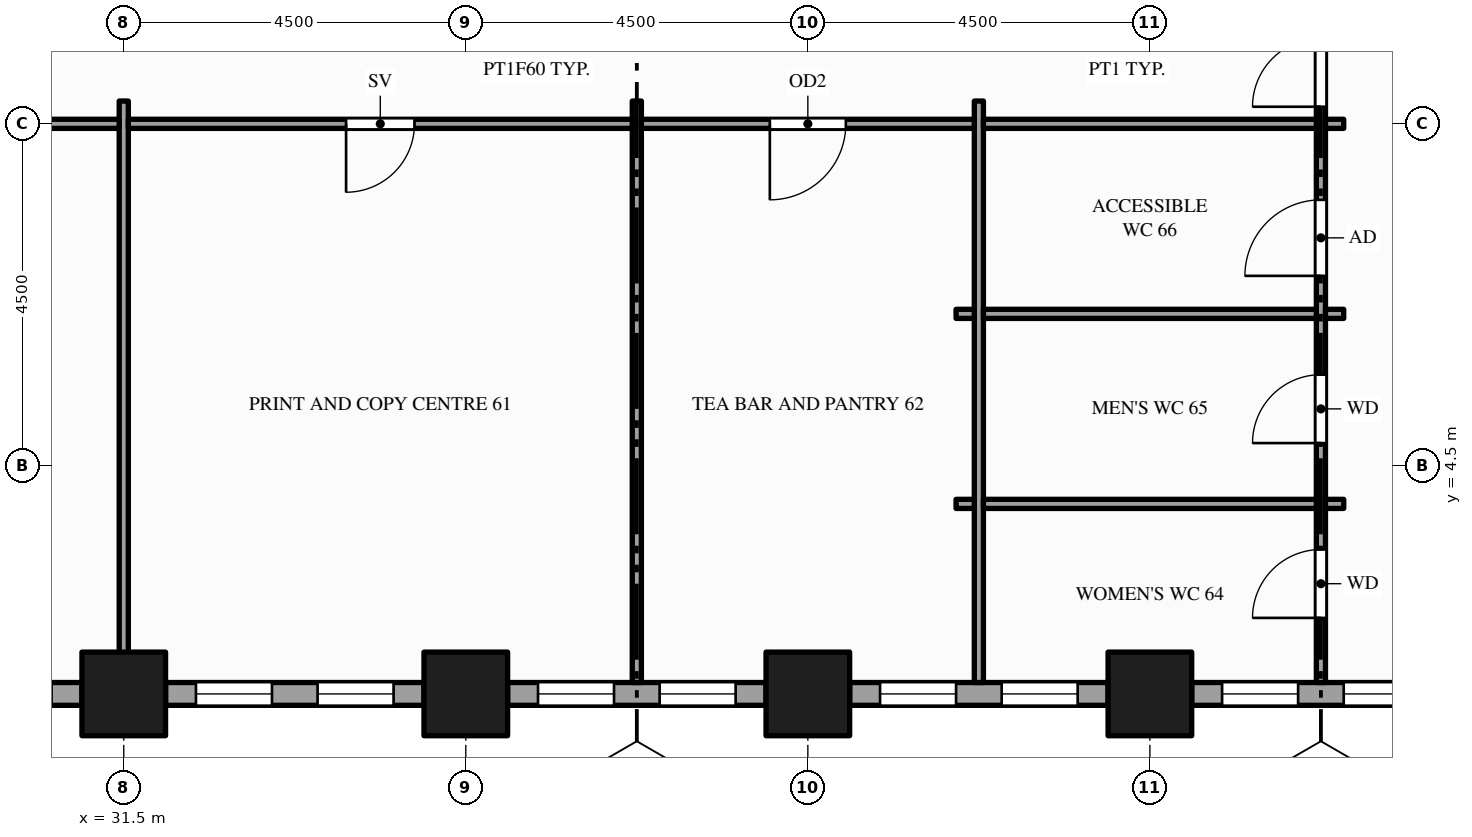
"""IFC4 building model, lengths in metres.
Left out: names, types, materials, properties, quantities, classifications, styles, units other than length and angle.
Written with IfcOpenShell. Run it as: python <this file> out.ifc"""

import sys

from ifc_helpers import new_model, si_unit, direction, frame, frame_2d, origin, origin_2d, place, context, subcontext, project, spatial, rectangle, hollow_rectangle, extrude, element, fill, save


model = new_model("IFC4")
c1 = context("Model", 3, precision=1e-05, world=origin(), true_north=direction((0.0, 1.0)))
c2 = subcontext(c1, "Body", "Model", "MODEL_VIEW")
j1 = project(units=[si_unit("LENGTHUNIT", "METRE"), si_unit("PLANEANGLEUNIT", "RADIAN")], contexts=[c1])
p1 = place(None, origin())
s1 = spatial("IfcSite", under=j1, at=p1, CompositionType="ELEMENT")
p2 = place(p1, origin())
s2 = spatial("IfcBuilding", under=s1, at=p2, CompositionType="ELEMENT")
p3 = place(p2, frame((0.0, 0.0, 73.0)))
s3 = spatial("IfcBuildingStorey", under=s2, at=p3, CompositionType="ELEMENT", Elevation=73.0)
for number, where, z_axis, x_axis in (
    (1, (31.5, 1.5, -0.15), (0.0, 0.0, 1.0), (1.0, 0.0, 0.0)),
    (2, (36.0, 1.5, -0.15), (0.0, 0.0, 1.0), (1.0, 0.0, 0.0)),
    (3, (40.5, 1.5, -0.15), (0.0, 0.0, 1.0), (1.0, 0.0, 0.0)),
    (4, (45.0, 1.5, -0.15), (0.0, 0.0, 1.0), (1.0, 0.0, 0.0)),
):
    element("IfcColumn", number, at=place(p3, frame(where, z_axis=z_axis, x_axis=x_axis)), inside=s3, PredefinedType="COLUMN", context=c2, shape_type="SweptSolid", body=[
        extrude(hollow_rectangle(XDim=1.1, YDim=1.1, WallThickness=0.06, at=origin_2d()), origin(), (0.0, 0.0, 1.0), 3.9),
    ])
p4 = place(p3, frame((27.55, 1.5, 0.0), z_axis=(0.0, 0.0, 1.0), x_axis=(1.0, 0.0, 0.0)))
e5 = element("IfcWall", 5, at=p4, inside=s3, PredefinedType="STANDARD", context=c2, shape_type="SweptSolid", body=[
    extrude(rectangle(XDim=3.4, YDim=0.3, at=frame_2d((1.7, 0.0))), origin(), (0.0, 0.0, 1.0), 2.838),
])
p5 = place(p4, frame((0.4, 0.0, 0.9)))
e6 = element("IfcOpeningElement", 6, at=p5, cuts=e5, PredefinedType="OPENING", context=c2, shape_type="SweptSolid", body=[
    extrude(rectangle(XDim=1.0, YDim=1.75, at=frame_2d((0.5, 0.875))), frame((0.0, 0.16, 0.0), z_axis=(0.0, -1.0, 0.0), x_axis=(1.0, 0.0, 0.0)), (0.0, 0.0, 1.0), 0.32),
])
p6 = place(p4, frame((2.0, 0.0, 0.9)))
e7 = element("IfcOpeningElement", 7, at=p6, cuts=e5, PredefinedType="OPENING", context=c2, shape_type="SweptSolid", body=[
    extrude(rectangle(XDim=1.0, YDim=1.75, at=frame_2d((0.5, 0.875))), frame((0.0, 0.16, 0.0), z_axis=(0.0, -1.0, 0.0), x_axis=(1.0, 0.0, 0.0)), (0.0, 0.0, 1.0), 0.32),
])
p7 = place(p3, frame((32.05, 1.5, 0.0), z_axis=(0.0, 0.0, 1.0), x_axis=(1.0, 0.0, 0.0)))
e8 = element("IfcWall", 8, at=p7, inside=s3, PredefinedType="STANDARD", context=c2, shape_type="SweptSolid", body=[
    extrude(rectangle(XDim=3.4, YDim=0.3, at=frame_2d((1.7, 0.0))), origin(), (0.0, 0.0, 1.0), 2.838),
])
p8 = place(p7, frame((0.4, 0.0, 0.9)))
e9 = element("IfcOpeningElement", 9, at=p8, cuts=e8, PredefinedType="OPENING", context=c2, shape_type="SweptSolid", body=[
    extrude(rectangle(XDim=1.0, YDim=1.75, at=frame_2d((0.5, 0.875))), frame((0.0, 0.16, 0.0), z_axis=(0.0, -1.0, 0.0), x_axis=(1.0, 0.0, 0.0)), (0.0, 0.0, 1.0), 0.32),
])
p9 = place(p7, frame((2.0, 0.0, 0.9)))
e10 = element("IfcOpeningElement", 10, at=p9, cuts=e8, PredefinedType="OPENING", context=c2, shape_type="SweptSolid", body=[
    extrude(rectangle(XDim=1.0, YDim=1.75, at=frame_2d((0.5, 0.875))), frame((0.0, 0.16, 0.0), z_axis=(0.0, -1.0, 0.0), x_axis=(1.0, 0.0, 0.0)), (0.0, 0.0, 1.0), 0.32),
])
p10 = place(p3, frame((36.55, 1.5, 0.0), z_axis=(0.0, 0.0, 1.0), x_axis=(1.0, 0.0, 0.0)))
e11 = element("IfcWall", 11, at=p10, inside=s3, PredefinedType="STANDARD", context=c2, shape_type="SweptSolid", body=[
    extrude(rectangle(XDim=3.4, YDim=0.3, at=frame_2d((1.7, 0.0))), origin(), (0.0, 0.0, 1.0), 2.838),
])
p11 = place(p10, frame((0.4, 0.0, 0.9)))
e12 = element("IfcOpeningElement", 12, at=p11, cuts=e11, PredefinedType="OPENING", context=c2, shape_type="SweptSolid", body=[
    extrude(rectangle(XDim=1.0, YDim=1.75, at=frame_2d((0.5, 0.875))), frame((0.0, 0.16, 0.0), z_axis=(0.0, -1.0, 0.0), x_axis=(1.0, 0.0, 0.0)), (0.0, 0.0, 1.0), 0.32),
])
p12 = place(p10, frame((2.0, 0.0, 0.9)))
e13 = element("IfcOpeningElement", 13, at=p12, cuts=e11, PredefinedType="OPENING", context=c2, shape_type="SweptSolid", body=[
    extrude(rectangle(XDim=1.0, YDim=1.75, at=frame_2d((0.5, 0.875))), frame((0.0, 0.16, 0.0), z_axis=(0.0, -1.0, 0.0), x_axis=(1.0, 0.0, 0.0)), (0.0, 0.0, 1.0), 0.32),
])
p13 = place(p3, frame((41.05, 1.5, 0.0), z_axis=(0.0, 0.0, 1.0), x_axis=(1.0, 0.0, 0.0)))
e14 = element("IfcWall", 14, at=p13, inside=s3, PredefinedType="STANDARD", context=c2, shape_type="SweptSolid", body=[
    extrude(rectangle(XDim=3.4, YDim=0.3, at=frame_2d((1.7, 0.0))), origin(), (0.0, 0.0, 1.0), 2.838),
])
p14 = place(p13, frame((0.4, 0.0, 0.9)))
e15 = element("IfcOpeningElement", 15, at=p14, cuts=e14, PredefinedType="OPENING", context=c2, shape_type="SweptSolid", body=[
    extrude(rectangle(XDim=1.0, YDim=1.75, at=frame_2d((0.5, 0.875))), frame((0.0, 0.16, 0.0), z_axis=(0.0, -1.0, 0.0), x_axis=(1.0, 0.0, 0.0)), (0.0, 0.0, 1.0), 0.32),
])
p15 = place(p13, frame((2.0, 0.0, 0.9)))
e16 = element("IfcOpeningElement", 16, at=p15, cuts=e14, PredefinedType="OPENING", context=c2, shape_type="SweptSolid", body=[
    extrude(rectangle(XDim=1.0, YDim=1.75, at=frame_2d((0.5, 0.875))), frame((0.0, 0.16, 0.0), z_axis=(0.0, -1.0, 0.0), x_axis=(1.0, 0.0, 0.0)), (0.0, 0.0, 1.0), 0.32),
])
p16 = place(p3, frame((45.55, 1.5, 0.0), z_axis=(0.0, 0.0, 1.0), x_axis=(1.0, 0.0, 0.0)))
e17 = element("IfcWall", 17, at=p16, inside=s3, PredefinedType="STANDARD", context=c2, shape_type="SweptSolid", body=[
    extrude(rectangle(XDim=3.4, YDim=0.3, at=frame_2d((1.7, 0.0))), origin(), (0.0, 0.0, 1.0), 2.838),
])
p17 = place(p16, frame((0.4, 0.0, 0.9)))
e18 = element("IfcOpeningElement", 18, at=p17, cuts=e17, PredefinedType="OPENING", context=c2, shape_type="SweptSolid", body=[
    extrude(rectangle(XDim=1.0, YDim=1.75, at=frame_2d((0.5, 0.875))), frame((0.0, 0.16, 0.0), z_axis=(0.0, -1.0, 0.0), x_axis=(1.0, 0.0, 0.0)), (0.0, 0.0, 1.0), 0.32),
])
p18 = place(p16, frame((2.0, 0.0, 0.9)))
e19 = element("IfcOpeningElement", 19, at=p18, cuts=e17, PredefinedType="OPENING", context=c2, shape_type="SweptSolid", body=[
    extrude(rectangle(XDim=1.0, YDim=1.75, at=frame_2d((0.5, 0.875))), frame((0.0, 0.16, 0.0), z_axis=(0.0, -1.0, 0.0), x_axis=(1.0, 0.0, 0.0)), (0.0, 0.0, 1.0), 0.32),
])
for number, where, z_axis, x_axis in (
    (20, (31.5, 1.65, 0.0), (0.0, 0.0, 1.0), (0.0, 1.0, 0.0)),
    (21, (38.25, 1.65, 0.0), (0.0, 0.0, 1.0), (0.0, 1.0, 0.0)),
    (22, (42.75, 1.65, 0.0), (0.0, 0.0, 1.0), (0.0, 1.0, 0.0)),
):
    element("IfcWall", number, at=place(p3, frame(where, z_axis=z_axis, x_axis=x_axis)), inside=s3, PredefinedType="PARTITIONING", context=c2, shape_type="SweptSolid", body=[
        extrude(rectangle(XDim=7.65, YDim=0.12, at=frame_2d((3.825, 0.0))), origin(), (0.0, 0.0, 1.0), 2.838),
    ])
p19 = place(p3, frame((47.25, 1.65, 0.0), z_axis=(0.0, 0.0, 1.0), x_axis=(0.0, 1.0, 0.0)))
e23 = element("IfcWall", 23, at=p19, inside=s3, PredefinedType="PARTITIONING", context=c2, shape_type="SweptSolid", body=[
    extrude(rectangle(XDim=22.2, YDim=0.12, at=frame_2d((11.1, 0.0))), origin(), (0.0, 0.0, 1.0), 2.838),
])
p20 = place(p19, frame((7.575, 0.0, 0.0)))
e24 = element("IfcOpeningElement", 24, at=p20, cuts=e23, PredefinedType="OPENING", context=c2, shape_type="SweptSolid", body=[
    extrude(rectangle(XDim=1.8, YDim=2.1, at=frame_2d((0.9, 1.05))), frame((0.0, 0.07, 0.0), z_axis=(0.0, -1.0, 0.0), x_axis=(1.0, 0.0, 0.0)), (0.0, 0.0, 1.0), 0.14),
])
p21 = place(p19, frame((0.85, 0.0, 0.0)))
e25 = element("IfcOpeningElement", 25, at=p21, cuts=e23, PredefinedType="OPENING", context=c2, shape_type="SweptSolid", body=[
    extrude(rectangle(XDim=0.9, YDim=2.1, at=frame_2d((0.45, 1.05))), frame((0.0, 0.07, 0.0), z_axis=(0.0, -1.0, 0.0), x_axis=(1.0, 0.0, 0.0)), (0.0, 0.0, 1.0), 0.14),
])
p22 = place(p19, frame((3.15, 0.0, 0.0)))
e26 = element("IfcOpeningElement", 26, at=p22, cuts=e23, PredefinedType="OPENING", context=c2, shape_type="SweptSolid", body=[
    extrude(rectangle(XDim=0.9, YDim=2.1, at=frame_2d((0.45, 1.05))), frame((0.0, 0.07, 0.0), z_axis=(0.0, -1.0, 0.0), x_axis=(1.0, 0.0, 0.0)), (0.0, 0.0, 1.0), 0.14),
])
p23 = place(p19, frame((5.35, 0.0, 0.0)))
e27 = element("IfcOpeningElement", 27, at=p23, cuts=e23, PredefinedType="OPENING", context=c2, shape_type="SweptSolid", body=[
    extrude(rectangle(XDim=1.0, YDim=2.1, at=frame_2d((0.5, 1.05))), frame((0.0, 0.07, 0.0), z_axis=(0.0, -1.0, 0.0), x_axis=(1.0, 0.0, 0.0)), (0.0, 0.0, 1.0), 0.14),
])
p24 = place(p3, frame((42.45, 4.0, 0.0), z_axis=(0.0, 0.0, 1.0), x_axis=(1.0, 0.0, 0.0)))
e28 = element("IfcWall", 28, at=p24, inside=s3, PredefinedType="PARTITIONING", context=c2, shape_type="SweptSolid", body=[
    extrude(rectangle(XDim=0.24, YDim=0.12, at=frame_2d((0.12, 0.0))), origin(), (0.0, 0.0, 1.0), 2.838),
])
p25 = place(p3, frame((42.81, 4.0, 0.0), z_axis=(0.0, 0.0, 1.0), x_axis=(1.0, 0.0, 0.0)))
e29 = element("IfcWall", 29, at=p25, inside=s3, PredefinedType="PARTITIONING", context=c2, shape_type="SweptSolid", body=[
    extrude(rectangle(XDim=4.38, YDim=0.12, at=frame_2d((2.19, 0.0))), origin(), (0.0, 0.0, 1.0), 2.838),
])
for number, where, z_axis, x_axis in (
    (30, (47.31, 4.0, 0.0), (0.0, 0.0, 1.0), (1.0, 0.0, 0.0)),
    (31, (42.45, 6.5, 0.0), (0.0, 0.0, 1.0), (1.0, 0.0, 0.0)),
):
    element("IfcWall", number, at=place(p3, frame(where, z_axis=z_axis, x_axis=x_axis)), inside=s3, PredefinedType="PARTITIONING", context=c2, shape_type="SweptSolid", body=[
        extrude(rectangle(XDim=0.24, YDim=0.12, at=frame_2d((0.12, 0.0))), origin(), (0.0, 0.0, 1.0), 2.838),
    ])
p26 = place(p3, frame((42.81, 6.5, 0.0), z_axis=(0.0, 0.0, 1.0), x_axis=(1.0, 0.0, 0.0)))
e32 = element("IfcWall", 32, at=p26, inside=s3, PredefinedType="PARTITIONING", context=c2, shape_type="SweptSolid", body=[
    extrude(rectangle(XDim=4.38, YDim=0.12, at=frame_2d((2.19, 0.0))), origin(), (0.0, 0.0, 1.0), 2.838),
])
p27 = place(p3, frame((47.31, 6.5, 0.0), z_axis=(0.0, 0.0, 1.0), x_axis=(1.0, 0.0, 0.0)))
e33 = element("IfcWall", 33, at=p27, inside=s3, PredefinedType="PARTITIONING", context=c2, shape_type="SweptSolid", body=[
    extrude(rectangle(XDim=0.24, YDim=0.12, at=frame_2d((0.12, 0.0))), origin(), (0.0, 0.0, 1.0), 2.838),
])
p28 = place(p3, frame((27.06, 9.0, 0.0), z_axis=(0.0, 0.0, 1.0), x_axis=(1.0, 0.0, 0.0)))
e34 = element("IfcWall", 34, at=p28, inside=s3, PredefinedType="PARTITIONING", context=c2, shape_type="SweptSolid", body=[
    extrude(rectangle(XDim=4.38, YDim=0.12, at=frame_2d((2.19, 0.0))), origin(), (0.0, 0.0, 1.0), 2.838),
])
p29 = place(p28, frame((1.74, 0.0, 0.0)))
e35 = element("IfcOpeningElement", 35, at=p29, cuts=e34, PredefinedType="OPENING", context=c2, shape_type="SweptSolid", body=[
    extrude(rectangle(XDim=0.9, YDim=2.1, at=frame_2d((0.45, 1.05))), frame((0.0, 0.07, 0.0), z_axis=(0.0, -1.0, 0.0), x_axis=(1.0, 0.0, 0.0)), (0.0, 0.0, 1.0), 0.14),
])
p30 = place(p3, frame((31.56, 9.0, 0.0), z_axis=(0.0, 0.0, 1.0), x_axis=(1.0, 0.0, 0.0)))
e36 = element("IfcWall", 36, at=p30, inside=s3, PredefinedType="PARTITIONING", context=c2, shape_type="SweptSolid", body=[
    extrude(rectangle(XDim=6.63, YDim=0.12, at=frame_2d((3.315, 0.0))), origin(), (0.0, 0.0, 1.0), 2.838),
])
p31 = place(p30, frame((2.865, 0.0, 0.0)))
e37 = element("IfcOpeningElement", 37, at=p31, cuts=e36, PredefinedType="OPENING", context=c2, shape_type="SweptSolid", body=[
    extrude(rectangle(XDim=0.9, YDim=2.1, at=frame_2d((0.45, 1.05))), frame((0.0, 0.07, 0.0), z_axis=(0.0, -1.0, 0.0), x_axis=(1.0, 0.0, 0.0)), (0.0, 0.0, 1.0), 0.14),
])
p32 = place(p3, frame((38.31, 9.0, 0.0), z_axis=(0.0, 0.0, 1.0), x_axis=(1.0, 0.0, 0.0)))
e38 = element("IfcWall", 38, at=p32, inside=s3, PredefinedType="PARTITIONING", context=c2, shape_type="SweptSolid", body=[
    extrude(rectangle(XDim=4.38, YDim=0.12, at=frame_2d((2.19, 0.0))), origin(), (0.0, 0.0, 1.0), 2.838),
])
p33 = place(p32, frame((1.69, 0.0, 0.0)))
e39 = element("IfcOpeningElement", 39, at=p33, cuts=e38, PredefinedType="OPENING", context=c2, shape_type="SweptSolid", body=[
    extrude(rectangle(XDim=1.0, YDim=2.1, at=frame_2d((0.5, 1.05))), frame((0.0, 0.07, 0.0), z_axis=(0.0, -1.0, 0.0), x_axis=(1.0, 0.0, 0.0)), (0.0, 0.0, 1.0), 0.14),
])
p34 = place(p3, frame((42.81, 9.0, 0.0), z_axis=(0.0, 0.0, 1.0), x_axis=(1.0, 0.0, 0.0)))
e40 = element("IfcWall", 40, at=p34, inside=s3, PredefinedType="PARTITIONING", context=c2, shape_type="SweptSolid", body=[
    extrude(rectangle(XDim=4.38, YDim=0.12, at=frame_2d((2.19, 0.0))), origin(), (0.0, 0.0, 1.0), 2.838),
])
p35 = place(p3, frame((47.31, 9.0, 0.0), z_axis=(0.0, 0.0, 1.0), x_axis=(1.0, 0.0, 0.0)))
e41 = element("IfcWall", 41, at=p35, inside=s3, PredefinedType="PARTITIONING", context=c2, shape_type="SweptSolid", body=[
    extrude(rectangle(XDim=0.24, YDim=0.12, at=frame_2d((0.12, 0.0))), origin(), (0.0, 0.0, 1.0), 2.838),
])
p36 = place(p8, origin())
e42 = element("IfcWindow", 42, at=p36, inside=s3, PartitioningType="SINGLE_PANEL", PredefinedType="WINDOW", context=c2, shape_type="SweptSolid", body=[
    extrude(rectangle(XDim=1.0, YDim=1.75, at=frame_2d((0.5, 0.875))), frame((0.0, 0.03, 0.0), z_axis=(0.0, -1.0, 0.0), x_axis=(1.0, 0.0, 0.0)), (0.0, 0.0, 1.0), 0.06),
])
fill(e9, e42)
p37 = place(p9, origin())
e43 = element("IfcWindow", 43, at=p37, inside=s3, PartitioningType="SINGLE_PANEL", PredefinedType="WINDOW", context=c2, shape_type="SweptSolid", body=[
    extrude(rectangle(XDim=1.0, YDim=1.75, at=frame_2d((0.5, 0.875))), frame((0.0, 0.03, 0.0), z_axis=(0.0, -1.0, 0.0), x_axis=(1.0, 0.0, 0.0)), (0.0, 0.0, 1.0), 0.06),
])
fill(e10, e43)
p38 = place(p11, origin())
e44 = element("IfcWindow", 44, at=p38, inside=s3, PartitioningType="SINGLE_PANEL", PredefinedType="WINDOW", context=c2, shape_type="SweptSolid", body=[
    extrude(rectangle(XDim=1.0, YDim=1.75, at=frame_2d((0.5, 0.875))), frame((0.0, 0.03, 0.0), z_axis=(0.0, -1.0, 0.0), x_axis=(1.0, 0.0, 0.0)), (0.0, 0.0, 1.0), 0.06),
])
fill(e12, e44)
p39 = place(p12, origin())
e45 = element("IfcWindow", 45, at=p39, inside=s3, PartitioningType="SINGLE_PANEL", PredefinedType="WINDOW", context=c2, shape_type="SweptSolid", body=[
    extrude(rectangle(XDim=1.0, YDim=1.75, at=frame_2d((0.5, 0.875))), frame((0.0, 0.03, 0.0), z_axis=(0.0, -1.0, 0.0), x_axis=(1.0, 0.0, 0.0)), (0.0, 0.0, 1.0), 0.06),
])
fill(e13, e45)
p40 = place(p14, origin())
e46 = element("IfcWindow", 46, at=p40, inside=s3, PartitioningType="SINGLE_PANEL", PredefinedType="WINDOW", context=c2, shape_type="SweptSolid", body=[
    extrude(rectangle(XDim=1.0, YDim=1.75, at=frame_2d((0.5, 0.875))), frame((0.0, 0.03, 0.0), z_axis=(0.0, -1.0, 0.0), x_axis=(1.0, 0.0, 0.0)), (0.0, 0.0, 1.0), 0.06),
])
fill(e15, e46)
p41 = place(p15, origin())
e47 = element("IfcWindow", 47, at=p41, inside=s3, PartitioningType="SINGLE_PANEL", PredefinedType="WINDOW", context=c2, shape_type="SweptSolid", body=[
    extrude(rectangle(XDim=1.0, YDim=1.75, at=frame_2d((0.5, 0.875))), frame((0.0, 0.03, 0.0), z_axis=(0.0, -1.0, 0.0), x_axis=(1.0, 0.0, 0.0)), (0.0, 0.0, 1.0), 0.06),
])
fill(e16, e47)
p42 = place(p17, origin())
e48 = element("IfcWindow", 48, at=p42, inside=s3, PartitioningType="SINGLE_PANEL", PredefinedType="WINDOW", context=c2, shape_type="SweptSolid", body=[
    extrude(rectangle(XDim=1.0, YDim=1.75, at=frame_2d((0.5, 0.875))), frame((0.0, 0.03, 0.0), z_axis=(0.0, -1.0, 0.0), x_axis=(1.0, 0.0, 0.0)), (0.0, 0.0, 1.0), 0.06),
])
fill(e18, e48)
p43 = place(p18, origin())
e49 = element("IfcWindow", 49, at=p43, inside=s3, PartitioningType="SINGLE_PANEL", PredefinedType="WINDOW", context=c2, shape_type="SweptSolid", body=[
    extrude(rectangle(XDim=1.0, YDim=1.75, at=frame_2d((0.5, 0.875))), frame((0.0, 0.03, 0.0), z_axis=(0.0, -1.0, 0.0), x_axis=(1.0, 0.0, 0.0)), (0.0, 0.0, 1.0), 0.06),
])
fill(e19, e49)
p44 = place(p20, origin())
e50 = element("IfcDoor", 50, at=p44, inside=s3, OperationType="DOUBLE_DOOR_SINGLE_SWING", PredefinedType="DOOR", context=c2, shape_type="SweptSolid", body=[
    extrude(rectangle(XDim=1.8, YDim=2.1, at=frame_2d((0.9, 1.05))), frame((0.0, 0.025, 0.0), z_axis=(0.0, -1.0, 0.0), x_axis=(1.0, 0.0, 0.0)), (0.0, 0.0, 1.0), 0.05),
])
fill(e24, e50)
p45 = place(p31, origin())
e51 = element("IfcDoor", 51, at=p45, inside=s3, OperationType="SINGLE_SWING_LEFT", PredefinedType="DOOR", context=c2, shape_type="SweptSolid", body=[
    extrude(rectangle(XDim=0.9, YDim=2.1, at=frame_2d((0.45, 1.05))), frame((0.0, 0.025, 0.0), z_axis=(0.0, -1.0, 0.0), x_axis=(1.0, 0.0, 0.0)), (0.0, 0.0, 1.0), 0.05),
])
fill(e37, e51)
p46 = place(p33, origin())
e52 = element("IfcDoor", 52, at=p46, inside=s3, OperationType="SINGLE_SWING_LEFT", PredefinedType="DOOR", context=c2, shape_type="SweptSolid", body=[
    extrude(rectangle(XDim=1.0, YDim=2.1, at=frame_2d((0.5, 1.05))), frame((0.0, 0.025, 0.0), z_axis=(0.0, -1.0, 0.0), x_axis=(1.0, 0.0, 0.0)), (0.0, 0.0, 1.0), 0.05),
])
fill(e39, e52)
p47 = place(p21, origin())
e53 = element("IfcDoor", 53, at=p47, inside=s3, OperationType="SINGLE_SWING_LEFT", PredefinedType="DOOR", context=c2, shape_type="SweptSolid", body=[
    extrude(rectangle(XDim=0.9, YDim=2.1, at=frame_2d((0.45, 1.05))), frame((0.0, 0.025, 0.0), z_axis=(0.0, -1.0, 0.0), x_axis=(1.0, 0.0, 0.0)), (0.0, 0.0, 1.0), 0.05),
])
fill(e25, e53)
p48 = place(p22, origin())
e54 = element("IfcDoor", 54, at=p48, inside=s3, OperationType="SINGLE_SWING_LEFT", PredefinedType="DOOR", context=c2, shape_type="SweptSolid", body=[
    extrude(rectangle(XDim=0.9, YDim=2.1, at=frame_2d((0.45, 1.05))), frame((0.0, 0.025, 0.0), z_axis=(0.0, -1.0, 0.0), x_axis=(1.0, 0.0, 0.0)), (0.0, 0.0, 1.0), 0.05),
])
fill(e26, e54)
p49 = place(p23, origin())
e55 = element("IfcDoor", 55, at=p49, inside=s3, OperationType="SINGLE_SWING_LEFT", PredefinedType="DOOR", context=c2, shape_type="SweptSolid", body=[
    extrude(rectangle(XDim=1.0, YDim=2.1, at=frame_2d((0.5, 1.05))), frame((0.0, 0.025, 0.0), z_axis=(0.0, -1.0, 0.0), x_axis=(1.0, 0.0, 0.0)), (0.0, 0.0, 1.0), 0.05),
])
fill(e27, e55)
save(model, sys.argv[1])
